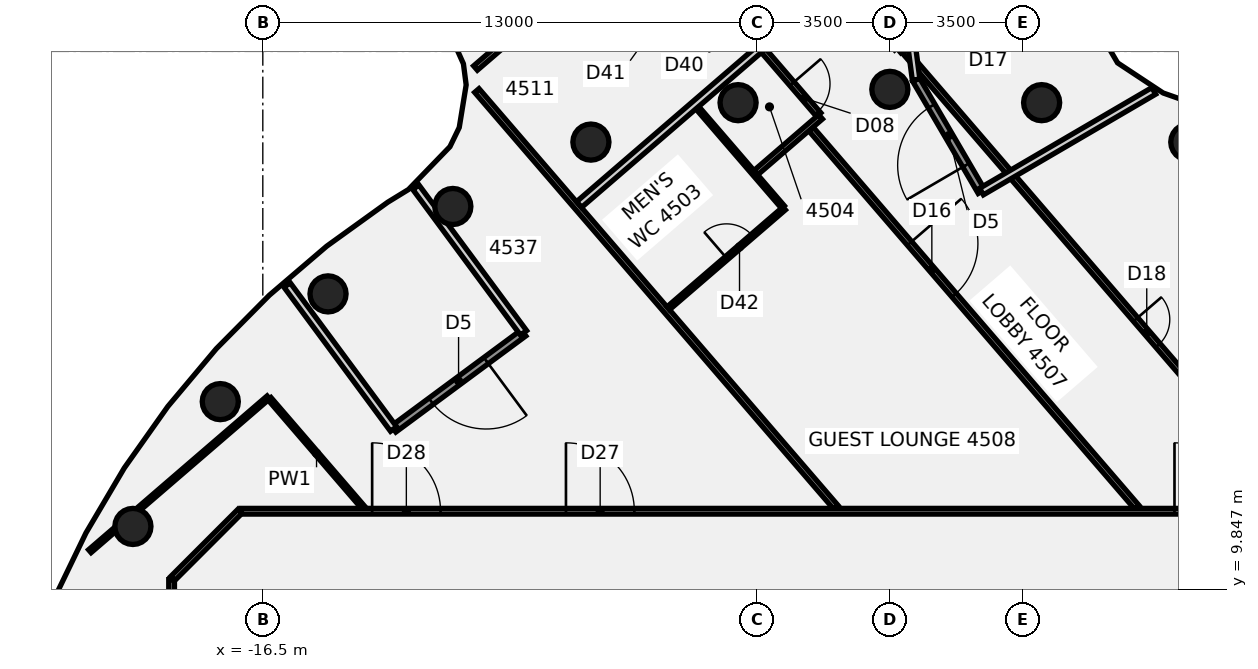
"""IFC4 building model, lengths in metres.
Left out: names, types, materials, properties, quantities, classifications, styles, units other than length and angle.
Written with IfcOpenShell. Run it as: python <this file> out.ifc"""

import sys

from ifc_helpers import new_model, si_unit, direction, frame, frame_2d, origin, origin_2d, place, context, subcontext, project, spatial, rectangle, circle, extrude, element, fill, save


model = new_model("IFC4")
c1 = context("Model", 3, precision=1e-05, world=origin(), true_north=direction((0.0, 1.0)))
c2 = subcontext(c1, "Body", "Model", "MODEL_VIEW")
j1 = project(units=[si_unit("LENGTHUNIT", "METRE"), si_unit("PLANEANGLEUNIT", "RADIAN")], contexts=[c1])
p1 = place(None, origin())
s1 = spatial("IfcSite", under=j1, at=p1, CompositionType="ELEMENT")
p2 = place(p1, origin())
s2 = spatial("IfcBuilding", under=s1, at=p2, CompositionType="ELEMENT")
p3 = place(p2, frame((0.0, 0.0, 182.5)))
s3 = spatial("IfcBuildingStorey", under=s2, at=p3, CompositionType="ELEMENT", Elevation=182.5)
for number, where, z_axis, x_axis in (
    (1, (7.866, 21.613, -0.14), (0.0, 0.0, 1.0), (1.0, 0.0, 0.0)),
    (2, (3.994, 22.651, -0.14), (0.0, 0.0, 1.0), (1.0, 0.0, 0.0)),
    (3, (0.0, 23.0, -0.14), (0.0, 0.0, 1.0), (1.0, 0.0, 0.0)),
    (4, (-3.994, 22.651, -0.14), (0.0, 0.0, 1.0), (1.0, 0.0, 0.0)),
    (5, (-7.866, 21.613, -0.14), (0.0, 0.0, 1.0), (1.0, 0.0, 0.0)),
    (6, (-11.5, 19.919, -0.14), (0.0, 0.0, 1.0), (1.0, 0.0, 0.0)),
    (7, (-14.784, 17.619, -0.14), (0.0, 0.0, 1.0), (1.0, 0.0, 0.0)),
    (8, (-17.619, 14.784, -0.14), (0.0, 0.0, 1.0), (1.0, 0.0, 0.0)),
    (9, (-19.919, 11.5, -0.14), (0.0, 0.0, 1.0), (1.0, 0.0, 0.0)),
):
    element("IfcColumn", number, at=place(p3, frame(where, z_axis=z_axis, x_axis=x_axis)), inside=s3, PredefinedType="COLUMN", context=c2, shape_type="SweptSolid", body=[
        extrude(circle(Radius=0.475, at=origin_2d()), origin(), (0.0, 0.0, 1.0), 3.6),
    ])
p4 = place(p3, frame((-9.584, 24.698, -0.135), z_axis=(-0.013229584391, -0.048576320124, 0.998731855515), x_axis=(0.757717932984, 0.651247732409, 0.04171240903)))
e10 = element("IfcColumn", 10, at=p4, inside=s3, PredefinedType="COLUMN", context=c2, shape_type="SweptSolid", body=[
    extrude(rectangle(XDim=0.9, YDim=0.9, at=origin_2d()), origin(), (0.0, 0.0, 1.0), 3.599),
])
p5 = place(p3, frame((-16.321, 14.858, 0.0), z_axis=(0.0, 0.0, 1.0), x_axis=(0.652675414557, -0.757637646393, 0.0)))
e11 = element("IfcWall", 11, at=p5, inside=s3, PredefinedType="PARTITIONING", context=c2, shape_type="SweptSolid", body=[
    extrude(rectangle(XDim=3.784, YDim=0.1, at=frame_2d((1.892, 0.0))), origin(), (0.0, 0.0, 1.0), 2.864),
])
p6 = place(p3, frame((-12.149, 34.262, 0.0), z_axis=(0.0, 0.0, 1.0), x_axis=(0.652651241908, -0.75765846952, 0.0)))
e12 = element("IfcWall", 12, at=p6, inside=s3, PredefinedType="PARTITIONING", context=c2, shape_type="SweptSolid", body=[
    extrude(rectangle(XDim=15.745, YDim=0.15, at=frame_2d((7.873, 0.0))), origin(), (0.0, 0.0, 1.0), 2.864),
])
p7 = place(p6, frame((14.67, 0.0, 0.0)))
e13 = element("IfcOpeningElement", 13, at=p7, cuts=e12, PredefinedType="OPENING", context=c2, shape_type="SweptSolid", body=[
    extrude(rectangle(XDim=1.0, YDim=2.1, at=frame_2d((0.5, 1.05))), frame((0.0, 0.085, 0.0), z_axis=(0.0, -1.0, 0.0), x_axis=(1.0, 0.0, 0.0)), (0.0, 0.0, 1.0), 0.17),
])
p8 = place(p6, frame((12.02, 0.0, 0.0)))
e14 = element("IfcOpeningElement", 14, at=p8, cuts=e12, PredefinedType="OPENING", context=c2, shape_type="SweptSolid", body=[
    extrude(rectangle(XDim=0.9, YDim=2.1, at=frame_2d((0.45, 1.05))), frame((0.0, 0.085, 0.0), z_axis=(0.0, -1.0, 0.0), x_axis=(1.0, 0.0, 0.0)), (0.0, 0.0, 1.0), 0.17),
])
p9 = place(p6, frame((5.32, 0.0, 0.0)))
e15 = element("IfcOpeningElement", 15, at=p9, cuts=e12, PredefinedType="OPENING", context=c2, shape_type="SweptSolid", body=[
    extrude(rectangle(XDim=0.9, YDim=2.1, at=frame_2d((0.45, 1.05))), frame((0.0, 0.085, 0.0), z_axis=(0.0, -1.0, 0.0), x_axis=(1.0, 0.0, 0.0)), (0.0, 0.0, 1.0), 0.17),
])
p10 = place(p6, frame((3.02, 0.0, 0.0)))
e16 = element("IfcOpeningElement", 16, at=p10, cuts=e12, PredefinedType="OPENING", context=c2, shape_type="SweptSolid", body=[
    extrude(rectangle(XDim=0.9, YDim=2.1, at=frame_2d((0.45, 1.05))), frame((0.0, 0.085, 0.0), z_axis=(0.0, -1.0, 0.0), x_axis=(1.0, 0.0, 0.0)), (0.0, 0.0, 1.0), 0.17),
])
p11 = place(p3, frame((-10.868, 22.97, 0.0), z_axis=(0.0, 0.0, 1.0), x_axis=(0.652748053076, -0.757575065063, 0.0)))
e17 = element("IfcWall", 17, at=p11, inside=s3, PredefinedType="PARTITIONING", context=c2, shape_type="SweptSolid", body=[
    extrude(rectangle(XDim=14.472, YDim=0.15, at=frame_2d((7.236, 0.0))), origin(), (0.0, 0.0, 1.0), 2.864),
])
p12 = place(p3, frame((-5.067, 22.518, 0.0), z_axis=(0.0, 0.0, 1.0), x_axis=(0.652759016161, -0.757565618821, 0.0)))
e18 = element("IfcWall", 18, at=p12, inside=s3, PredefinedType="PARTITIONING", context=c2, shape_type="SweptSolid", body=[
    extrude(rectangle(XDim=3.45, YDim=0.1, at=frame_2d((1.725, 0.0))), origin(), (0.0, 0.0, 1.0), 2.864),
])
p13 = place(p3, frame((-2.074, 21.955, 0.0), z_axis=(0.0, 0.0, 1.0), x_axis=(0.652736603542, -0.757584930154, 0.0)))
e19 = element("IfcWall", 19, at=p13, inside=s3, PredefinedType="PARTITIONING", context=c2, shape_type="SweptSolid", body=[
    extrude(rectangle(XDim=13.133, YDim=0.15, at=frame_2d((6.566, 0.0))), origin(), (0.0, 0.0, 1.0), 2.864),
])
p14 = place(p13, frame((3.97, 0.0, 0.0)))
e20 = element("IfcOpeningElement", 20, at=p14, cuts=e19, PredefinedType="OPENING", context=c2, shape_type="SweptSolid", body=[
    extrude(rectangle(XDim=1.8, YDim=2.1, at=frame_2d((0.9, 1.05))), frame((0.0, 0.085, 0.0), z_axis=(0.0, -1.0, 0.0), x_axis=(1.0, 0.0, 0.0)), (0.0, 0.0, 1.0), 0.17),
])
p15 = place(p3, frame((0.376, 24.014, 0.0), z_axis=(0.0, 0.0, 1.0), x_axis=(0.652727037731, -0.75759317197, 0.0)))
e21 = element("IfcWall", 21, at=p15, inside=s3, PredefinedType="PARTITIONING", context=c2, shape_type="SweptSolid", body=[
    extrude(rectangle(XDim=15.2, YDim=0.15, at=frame_2d((7.6, 0.0))), origin(), (0.0, 0.0, 1.0), 2.864),
])
p16 = place(p15, frame((9.33, 0.0, 0.0)))
e22 = element("IfcOpeningElement", 22, at=p16, cuts=e21, PredefinedType="OPENING", context=c2, shape_type="SweptSolid", body=[
    extrude(rectangle(XDim=0.9, YDim=2.1, at=frame_2d((0.45, 1.05))), frame((0.0, 0.085, 0.0), z_axis=(0.0, -1.0, 0.0), x_axis=(1.0, 0.0, 0.0)), (0.0, 0.0, 1.0), 0.17),
])
p17 = place(p3, frame((-17.065, 11.9, 0.0), z_axis=(0.0, 0.0, 1.0), x_axis=(1.0, 0.0, 0.0)))
e23 = element("IfcWall", 23, at=p17, inside=s3, PredefinedType="PARTITIONING", context=c2, shape_type="SweptSolid", body=[
    extrude(rectangle(XDim=34.165, YDim=0.15, at=frame_2d((17.083, 0.0))), origin(), (0.0, 0.0, 1.0), 2.864),
])
p18 = place(p17, frame((24.555, 0.0, 0.0)))
e24 = element("IfcOpeningElement", 24, at=p18, cuts=e23, PredefinedType="OPENING", context=c2, shape_type="SweptSolid", body=[
    extrude(rectangle(XDim=1.8, YDim=2.1, at=frame_2d((0.9, 1.05))), frame((0.0, 0.085, 0.0), z_axis=(0.0, -1.0, 0.0), x_axis=(1.0, 0.0, 0.0)), (0.0, 0.0, 1.0), 0.17),
])
p19 = place(p17, frame((8.542, 0.0, 0.0)))
e25 = element("IfcOpeningElement", 25, at=p19, cuts=e23, PredefinedType="OPENING", context=c2, shape_type="SweptSolid", body=[
    extrude(rectangle(XDim=1.8, YDim=2.1, at=frame_2d((0.9, 1.05))), frame((0.0, 0.085, 0.0), z_axis=(0.0, -1.0, 0.0), x_axis=(1.0, 0.0, 0.0)), (0.0, 0.0, 1.0), 0.17),
])
p20 = place(p17, frame((3.442, 0.0, 0.0)))
e26 = element("IfcOpeningElement", 26, at=p20, cuts=e23, PredefinedType="OPENING", context=c2, shape_type="SweptSolid", body=[
    extrude(rectangle(XDim=1.8, YDim=2.1, at=frame_2d((0.9, 1.05))), frame((0.0, 0.085, 0.0), z_axis=(0.0, -1.0, 0.0), x_axis=(1.0, 0.0, 0.0)), (0.0, 0.0, 1.0), 0.17),
])
p21 = place(p3, frame((-21.052, 10.849, 0.0), z_axis=(0.0, 0.0, 1.0), x_axis=(0.757749789009, 0.652545214722, 0.0)))
e27 = element("IfcWall", 27, at=p21, inside=s3, PredefinedType="PARTITIONING", context=c2, shape_type="SweptSolid", body=[
    extrude(rectangle(XDim=0.882, YDim=0.1, at=frame_2d((0.441, 0.0))), origin(), (0.0, 0.0, 1.0), 2.864),
])
p22 = place(p3, frame((-19.777, 11.947, 0.0), z_axis=(0.0, 0.0, 1.0), x_axis=(0.757625544508, 0.652689462386, 0.0)))
e28 = element("IfcWall", 28, at=p22, inside=s3, PredefinedType="PARTITIONING", context=c2, shape_type="SweptSolid", body=[
    extrude(rectangle(XDim=4.518, YDim=0.1, at=frame_2d((2.259, 0.0))), origin(), (0.0, 0.0, 1.0), 2.864),
])
p23 = place(p3, frame((-10.904, 23.561, 0.0), z_axis=(0.0, 0.0, 1.0), x_axis=(0.757575802877, 0.652747196773, 0.0)))
e29 = element("IfcWall", 29, at=p23, inside=s3, PredefinedType="PARTITIONING", context=c2, shape_type="SweptSolid", body=[
    extrude(rectangle(XDim=1.13, YDim=0.15, at=frame_2d((0.565, 0.0))), origin(), (0.0, 0.0, 1.0), 2.864),
])
p24 = place(p3, frame((-8.177, 19.97, 0.0), z_axis=(0.0, 0.0, 1.0), x_axis=(0.757604641141, 0.652713725704, 0.0)))
e30 = element("IfcWall", 30, at=p24, inside=s3, PredefinedType="PARTITIONING", context=c2, shape_type="SweptSolid", body=[
    extrude(rectangle(XDim=14.219, YDim=0.2, at=frame_2d((7.109, 0.0))), origin(), (0.0, 0.0, 1.0), 2.864),
])
p25 = place(p24, frame((6.621, 0.0, 0.0)))
e31 = element("IfcOpeningElement", 31, at=p25, cuts=e30, PredefinedType="OPENING", context=c2, shape_type="SweptSolid", body=[
    extrude(rectangle(XDim=1.4, YDim=2.1, at=frame_2d((0.7, 1.05))), frame((0.0, 0.11, 0.0), z_axis=(0.0, -1.0, 0.0), x_axis=(1.0, 0.0, 0.0)), (0.0, 0.0, 1.0), 0.22),
])
p26 = place(p3, frame((-5.831, 17.24, 0.0), z_axis=(0.0, 0.0, 1.0), x_axis=(0.757627148994, 0.652687599934, 0.0)))
e32 = element("IfcWall", 32, at=p26, inside=s3, PredefinedType="PARTITIONING", context=c2, shape_type="SweptSolid", body=[
    extrude(rectangle(XDim=4.025, YDim=0.1, at=frame_2d((2.012, 0.0))), origin(), (0.0, 0.0, 1.0), 2.864),
])
p27 = place(p26, frame((2.025, 0.0, 0.0)))
e33 = element("IfcOpeningElement", 33, at=p27, cuts=e32, PredefinedType="OPENING", context=c2, shape_type="SweptSolid", body=[
    extrude(rectangle(XDim=0.9, YDim=2.1, at=frame_2d((0.45, 1.05))), frame((0.0, 0.06, 0.0), z_axis=(0.0, -1.0, 0.0), x_axis=(1.0, 0.0, 0.0)), (0.0, 0.0, 1.0), 0.12),
])
p28 = place(p3, frame((-3.52, 20.815, 0.0), z_axis=(0.0, 0.0, 1.0), x_axis=(0.757545656349, 0.65278218308, 0.0)))
e34 = element("IfcWall", 34, at=p28, inside=s3, PredefinedType="PARTITIONING", context=c2, shape_type="SweptSolid", body=[
    extrude(rectangle(XDim=2.24, YDim=0.15, at=frame_2d((1.12, 0.0))), origin(), (0.0, 0.0, 1.0), 2.864),
])
p29 = place(p3, frame((0.223, 24.04, 0.0), z_axis=(0.0, 0.0, 1.0), x_axis=(0.757558670656, 0.652767079834, 0.0)))
e35 = element("IfcWall", 35, at=p29, inside=s3, PredefinedType="PARTITIONING", context=c2, shape_type="SweptSolid", body=[
    extrude(rectangle(XDim=1.82, YDim=0.2, at=frame_2d((0.91, 0.0))), origin(), (0.0, 0.0, 1.0), 2.864),
])
p30 = place(p3, frame((-18.872, 10.128, 0.0), z_axis=(0.0, 0.0, 1.0), x_axis=(0.707106781187, 0.707106781187, 0.0)))
e36 = element("IfcWall", 36, at=p30, inside=s3, PredefinedType="PARTITIONING", context=c2, shape_type="SweptSolid", body=[
    extrude(rectangle(XDim=2.505, YDim=0.15, at=frame_2d((1.253, 0.0))), origin(), (0.0, 0.0, 1.0), 2.864),
])
p31 = place(p3, frame((-18.9, -10.1, 0.0), z_axis=(0.0, 0.0, 1.0), x_axis=(0.0, 1.0, 0.0)))
e37 = element("IfcWall", 37, at=p31, inside=s3, PredefinedType="PARTITIONING", context=c2, shape_type="SweptSolid", body=[
    extrude(rectangle(XDim=20.2, YDim=0.15, at=frame_2d((10.1, 0.0))), origin(), (0.0, 0.0, 1.0), 2.864),
])
p32 = place(p31, frame((12.009, 0.0, 0.0)))
e38 = element("IfcOpeningElement", 38, at=p32, cuts=e37, PredefinedType="OPENING", context=c2, shape_type="SweptSolid", body=[
    extrude(rectangle(XDim=1.8, YDim=2.1, at=frame_2d((0.9, 1.05))), frame((0.0, 0.085, 0.0), z_axis=(0.0, -1.0, 0.0), x_axis=(1.0, 0.0, 0.0)), (0.0, 0.0, 1.0), 0.17),
])
p33 = place(p31, frame((5.139, 0.0, 0.0)))
e39 = element("IfcOpeningElement", 39, at=p33, cuts=e37, PredefinedType="OPENING", context=c2, shape_type="SweptSolid", body=[
    extrude(rectangle(XDim=0.9, YDim=2.1, at=frame_2d((0.45, 1.05))), frame((0.0, 0.085, 0.0), z_axis=(0.0, -1.0, 0.0), x_axis=(1.0, 0.0, 0.0)), (0.0, 0.0, 1.0), 0.17),
])
p34 = place(p3, frame((-9.639, 16.593, 0.0), z_axis=(0.0, 0.0, 1.0), x_axis=(-0.804072359199, -0.594531446748, 0.0)))
e40 = element("IfcWall", 40, at=p34, inside=s3, PredefinedType="SOLIDWALL", context=c2, shape_type="SweptSolid", body=[
    extrude(rectangle(XDim=4.254, YDim=0.2, at=frame_2d((2.127, 0.0))), origin(), (0.0, 0.0, 1.0), 2.964),
])
p35 = place(p34, frame((1.227, 0.0, 0.0)))
e41 = element("IfcOpeningElement", 41, at=p35, cuts=e40, PredefinedType="OPENING", context=c2, shape_type="SweptSolid", body=[
    extrude(rectangle(XDim=1.8, YDim=2.4, at=frame_2d((0.9, 1.2))), frame((0.0, 0.11, 0.0), z_axis=(0.0, -1.0, 0.0), x_axis=(1.0, 0.0, 0.0)), (0.0, 0.0, 1.0), 0.22),
])
p36 = place(p3, frame((-9.639, 16.593, 0.0), z_axis=(0.0, 0.0, 1.0), x_axis=(-0.594543730189, 0.804063276672, 0.0)))
e42 = element("IfcWall", 42, at=p36, inside=s3, PredefinedType="SOLIDWALL", context=c2, shape_type="SweptSolid", body=[
    extrude(rectangle(XDim=4.766, YDim=0.2, at=frame_2d((2.383, 0.0))), origin(), (0.0, 0.0, 1.0), 3.46),
])
p37 = place(p3, frame((-13.059, 14.064, 0.0), z_axis=(0.0, 0.0, 1.0), x_axis=(-0.594539645469, 0.804066296996, 0.0)))
e43 = element("IfcWall", 43, at=p37, inside=s3, PredefinedType="SOLIDWALL", context=c2, shape_type="SweptSolid", body=[
    extrude(rectangle(XDim=4.712, YDim=0.2, at=frame_2d((2.356, 0.0))), origin(), (0.0, 0.0, 1.0), 3.46),
])
p38 = place(p3, frame((2.411, 20.311, 0.0), z_axis=(0.0, 0.0, 1.0), x_axis=(-0.504400373358, 0.863469897192, 0.0)))
e44 = element("IfcWall", 44, at=p38, inside=s3, PredefinedType="SOLIDWALL", context=c2, shape_type="SweptSolid", body=[
    extrude(rectangle(XDim=3.412, YDim=0.2, at=frame_2d((1.706, 0.0))), origin(), (0.0, 0.0, 1.0), 3.46),
])
p39 = place(p38, frame((0.806, 0.0, 0.0)))
e45 = element("IfcOpeningElement", 45, at=p39, cuts=e44, PredefinedType="OPENING", context=c2, shape_type="SweptSolid", body=[
    extrude(rectangle(XDim=1.8, YDim=2.4, at=frame_2d((0.9, 1.2))), frame((0.0, 0.11, 0.0), z_axis=(0.0, -1.0, 0.0), x_axis=(1.0, 0.0, 0.0)), (0.0, 0.0, 1.0), 0.22),
])
p40 = place(p3, frame((2.411, 20.312, 0.0), z_axis=(0.0, 0.0, 1.0), x_axis=(0.863468462435, 0.504402829472, 0.0)))
e46 = element("IfcWall", 46, at=p40, inside=s3, PredefinedType="SOLIDWALL", context=c2, shape_type="SweptSolid", body=[
    extrude(rectangle(XDim=5.251, YDim=0.2, at=frame_2d((2.625, 0.0))), origin(), (0.0, 0.0, 1.0), 2.964),
])
p41 = place(p3, frame((0.69, 23.257, 0.0), z_axis=(0.0, 0.0, 1.0), x_axis=(-0.130395335876, 0.991462080153, 0.0)))
e47 = element("IfcWall", 47, at=p41, inside=s3, PredefinedType="SOLIDWALL", context=c2, shape_type="SweptSolid", body=[
    extrude(rectangle(XDim=1.601, YDim=0.2, at=frame_2d((0.8, 0.0))), origin(), (0.0, 0.0, 1.0), 3.46),
])
p42 = place(p7, frame((1.0, 0.0, 0.0), z_axis=(0.0, 0.0, 1.0), x_axis=(-1.0, 0.0, 0.0)))
e48 = element("IfcDoor", 48, at=p42, inside=s3, OperationType="SINGLE_SWING_RIGHT", PredefinedType="DOOR", context=c2, shape_type="SweptSolid", body=[
    extrude(rectangle(XDim=1.0, YDim=2.1, at=frame_2d((0.5, 1.05))), frame((0.0, 0.025, 0.0), z_axis=(0.0, -1.0, 0.0), x_axis=(1.0, 0.0, 0.0)), (0.0, 0.0, 1.0), 0.05),
])
fill(e13, e48)
p43 = place(p14, frame((1.8, 0.0, 0.0), z_axis=(0.0, 0.0, 1.0), x_axis=(-1.0, 0.0, 0.0)))
e49 = element("IfcDoor", 49, at=p43, inside=s3, OperationType="DOUBLE_DOOR_SINGLE_SWING", PredefinedType="DOOR", context=c2, shape_type="SweptSolid", body=[
    extrude(rectangle(XDim=1.8, YDim=2.1, at=frame_2d((0.9, 1.05))), frame((0.0, 0.025, 0.0), z_axis=(0.0, -1.0, 0.0), x_axis=(1.0, 0.0, 0.0)), (0.0, 0.0, 1.0), 0.05),
])
fill(e20, e49)
p44 = place(p16, origin())
e50 = element("IfcDoor", 50, at=p44, inside=s3, OperationType="SINGLE_SWING_LEFT", PredefinedType="DOOR", context=c2, shape_type="SweptSolid", body=[
    extrude(rectangle(XDim=0.9, YDim=2.1, at=frame_2d((0.45, 1.05))), frame((0.0, 0.025, 0.0), z_axis=(0.0, -1.0, 0.0), x_axis=(1.0, 0.0, 0.0)), (0.0, 0.0, 1.0), 0.05),
])
fill(e22, e50)
p45 = place(p18, frame((1.8, 0.0, 0.0), z_axis=(0.0, 0.0, 1.0), x_axis=(-1.0, 0.0, 0.0)))
e51 = element("IfcDoor", 51, at=p45, inside=s3, OperationType="DOUBLE_DOOR_SINGLE_SWING", PredefinedType="DOOR", context=c2, shape_type="SweptSolid", body=[
    extrude(rectangle(XDim=1.8, YDim=2.1, at=frame_2d((0.9, 1.05))), frame((0.0, 0.025, 0.0), z_axis=(0.0, -1.0, 0.0), x_axis=(1.0, 0.0, 0.0)), (0.0, 0.0, 1.0), 0.05),
])
fill(e24, e51)
p46 = place(p19, origin())
e52 = element("IfcDoor", 52, at=p46, inside=s3, OperationType="DOUBLE_DOOR_SINGLE_SWING", PredefinedType="DOOR", context=c2, shape_type="SweptSolid", body=[
    extrude(rectangle(XDim=1.8, YDim=2.1, at=frame_2d((0.9, 1.05))), frame((0.0, 0.025, 0.0), z_axis=(0.0, -1.0, 0.0), x_axis=(1.0, 0.0, 0.0)), (0.0, 0.0, 1.0), 0.05),
])
fill(e25, e52)
p47 = place(p20, origin())
e53 = element("IfcDoor", 53, at=p47, inside=s3, OperationType="DOUBLE_DOOR_SINGLE_SWING", PredefinedType="DOOR", context=c2, shape_type="SweptSolid", body=[
    extrude(rectangle(XDim=1.8, YDim=2.1, at=frame_2d((0.9, 1.05))), frame((0.0, 0.025, 0.0), z_axis=(0.0, -1.0, 0.0), x_axis=(1.0, 0.0, 0.0)), (0.0, 0.0, 1.0), 0.05),
])
fill(e26, e53)
p48 = place(p27, origin())
e54 = element("IfcDoor", 54, at=p48, inside=s3, OperationType="SINGLE_SWING_LEFT", PredefinedType="DOOR", context=c2, shape_type="SweptSolid", body=[
    extrude(rectangle(XDim=0.9, YDim=2.1, at=frame_2d((0.45, 1.05))), frame((0.0, 0.025, 0.0), z_axis=(0.0, -1.0, 0.0), x_axis=(1.0, 0.0, 0.0)), (0.0, 0.0, 1.0), 0.05),
])
fill(e33, e54)
p49 = place(p35, origin())
e55 = element("IfcDoor", 55, at=p49, inside=s3, OperationType="SINGLE_SWING_LEFT", PredefinedType="DOOR", context=c2, shape_type="SweptSolid", body=[
    extrude(rectangle(XDim=1.8, YDim=2.4, at=frame_2d((0.9, 1.2))), frame((0.0, 0.025, 0.0), z_axis=(0.0, -1.0, 0.0), x_axis=(1.0, 0.0, 0.0)), (0.0, 0.0, 1.0), 0.05),
])
fill(e41, e55)
p50 = place(p39, origin())
e56 = element("IfcDoor", 56, at=p50, inside=s3, OperationType="SINGLE_SWING_LEFT", PredefinedType="DOOR", context=c2, shape_type="SweptSolid", body=[
    extrude(rectangle(XDim=1.8, YDim=2.4, at=frame_2d((0.9, 1.2))), frame((0.0, 0.025, 0.0), z_axis=(0.0, -1.0, 0.0), x_axis=(1.0, 0.0, 0.0)), (0.0, 0.0, 1.0), 0.05),
])
fill(e45, e56)
save(model, sys.argv[1])
